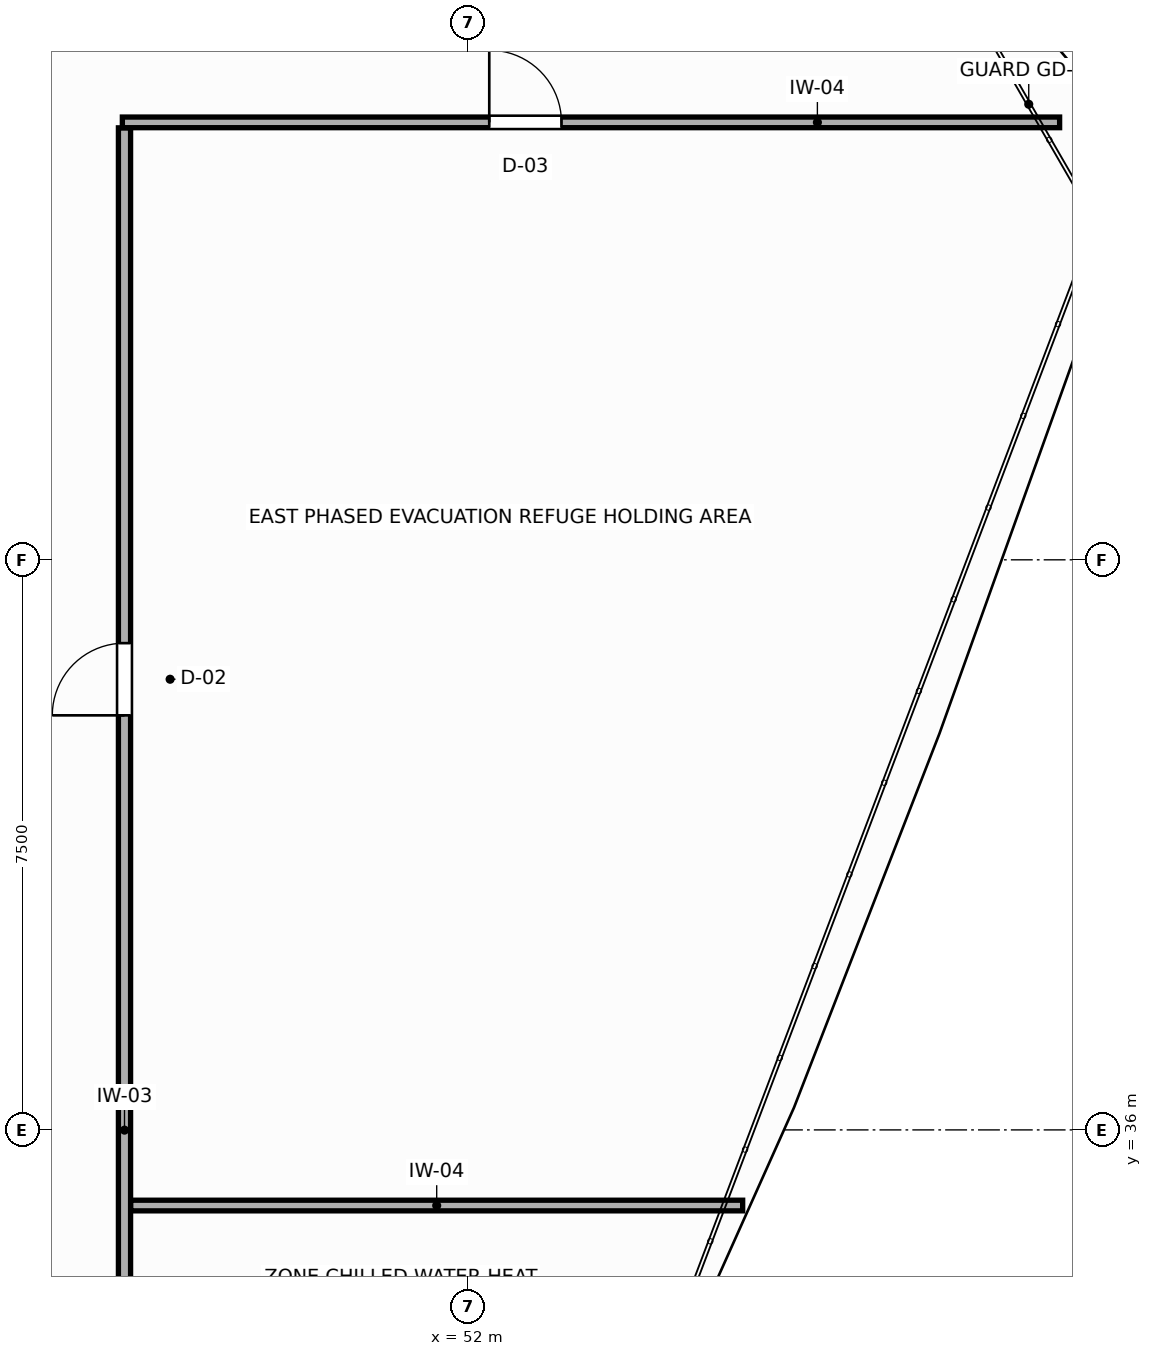
"""IFC4 building model, lengths in metres.
Left out: names, types, materials, properties, quantities, classifications, styles, units other than length and angle.
Written with IfcOpenShell. Run it as: python <this file> out.ifc"""

import sys

from ifc_helpers import new_model, si_unit, direction, frame, frame_2d, origin, place, context, subcontext, project, spatial, rectangle, extrude, element, fill, save


model = new_model("IFC4")
c1 = context("Model", 3, precision=1e-05, world=origin(), true_north=direction((0.0, 1.0)))
c2 = subcontext(c1, "Body", "Model", "MODEL_VIEW")
j1 = project(units=[si_unit("LENGTHUNIT", "METRE"), si_unit("PLANEANGLEUNIT", "RADIAN")], contexts=[c1])
p1 = place(None, origin())
s1 = spatial("IfcSite", under=j1, at=p1, CompositionType="ELEMENT")
p2 = place(p1, origin())
s2 = spatial("IfcBuilding", under=s1, at=p2, CompositionType="ELEMENT")
p3 = place(p2, frame((0.0, 0.0, 131.4)))
s3 = spatial("IfcBuildingStorey", under=s2, at=p3, CompositionType="ELEMENT", Elevation=131.4)
p4 = place(p3, frame((47.475, 30.72, 0.0), z_axis=(0.0, 0.0, 1.0), x_axis=(0.0, 1.0, 0.0)))
e1 = element("IfcWall", 1, at=p4, inside=s3, PredefinedType="PARTITIONING", context=c2, shape_type="SweptSolid", body=[
    extrude(rectangle(XDim=18.463, YDim=0.16, at=frame_2d((9.231, 0.0))), origin(), (0.0, 0.0, 1.0), 4.6),
])
p5 = place(p4, frame((10.734, 0.0, 0.0)))
e2 = element("IfcOpeningElement", 2, at=p5, cuts=e1, PredefinedType="OPENING", context=c2, shape_type="SweptSolid", body=[
    extrude(rectangle(XDim=0.95, YDim=2.05, at=frame_2d((0.475, 1.025))), frame((0.0, 0.09, 0.0), z_axis=(0.0, -1.0, 0.0), x_axis=(1.0, 0.0, 0.0)), (0.0, 0.0, 1.0), 0.18),
])
p6 = place(p3, frame((47.447, 49.255, 0.0), z_axis=(0.0, 0.0, 1.0), x_axis=(1.0, 0.0, 0.0)))
e3 = element("IfcWall", 3, at=p6, inside=s3, PredefinedType="PARTITIONING", context=c2, shape_type="SweptSolid", body=[
    extrude(rectangle(XDim=12.331, YDim=0.14, at=frame_2d((6.166, 0.0))), origin(), (0.0, 0.0, 1.0), 4.6),
])
p7 = place(p6, frame((4.827, 0.0, 0.0)))
e4 = element("IfcOpeningElement", 4, at=p7, cuts=e3, PredefinedType="OPENING", context=c2, shape_type="SweptSolid", body=[
    extrude(rectangle(XDim=0.95, YDim=2.05, at=frame_2d((0.475, 1.025))), frame((0.0, 0.08, 0.0), z_axis=(0.0, -1.0, 0.0), x_axis=(1.0, 0.0, 0.0)), (0.0, 0.0, 1.0), 0.16),
])
p8 = place(p3, frame((47.557, 35.005, 0.0), z_axis=(0.0, 0.0, 1.0), x_axis=(1.0, 0.0, 0.0)))
e5 = element("IfcWall", 5, at=p8, inside=s3, PredefinedType="PARTITIONING", context=c2, shape_type="SweptSolid", body=[
    extrude(rectangle(XDim=8.051, YDim=0.14, at=frame_2d((4.025, 0.0))), origin(), (0.0, 0.0, 1.0), 4.6),
])
p9 = place(p5, origin())
e6 = element("IfcDoor", 6, at=p9, inside=s3, OperationType="SINGLE_SWING_LEFT", PredefinedType="DOOR", context=c2, shape_type="SweptSolid", body=[
    extrude(rectangle(XDim=0.95, YDim=2.05, at=frame_2d((0.475, 1.025))), frame((0.0, 0.025, 0.0), z_axis=(0.0, -1.0, 0.0), x_axis=(1.0, 0.0, 0.0)), (0.0, 0.0, 1.0), 0.05),
])
fill(e2, e6)
p10 = place(p7, origin())
e7 = element("IfcDoor", 7, at=p10, inside=s3, OperationType="SINGLE_SWING_LEFT", PredefinedType="DOOR", context=c2, shape_type="SweptSolid", body=[
    extrude(rectangle(XDim=0.95, YDim=2.05, at=frame_2d((0.475, 1.025))), frame((0.0, 0.025, 0.0), z_axis=(0.0, -1.0, 0.0), x_axis=(1.0, 0.0, 0.0)), (0.0, 0.0, 1.0), 0.05),
])
fill(e4, e7)
save(model, sys.argv[1])
